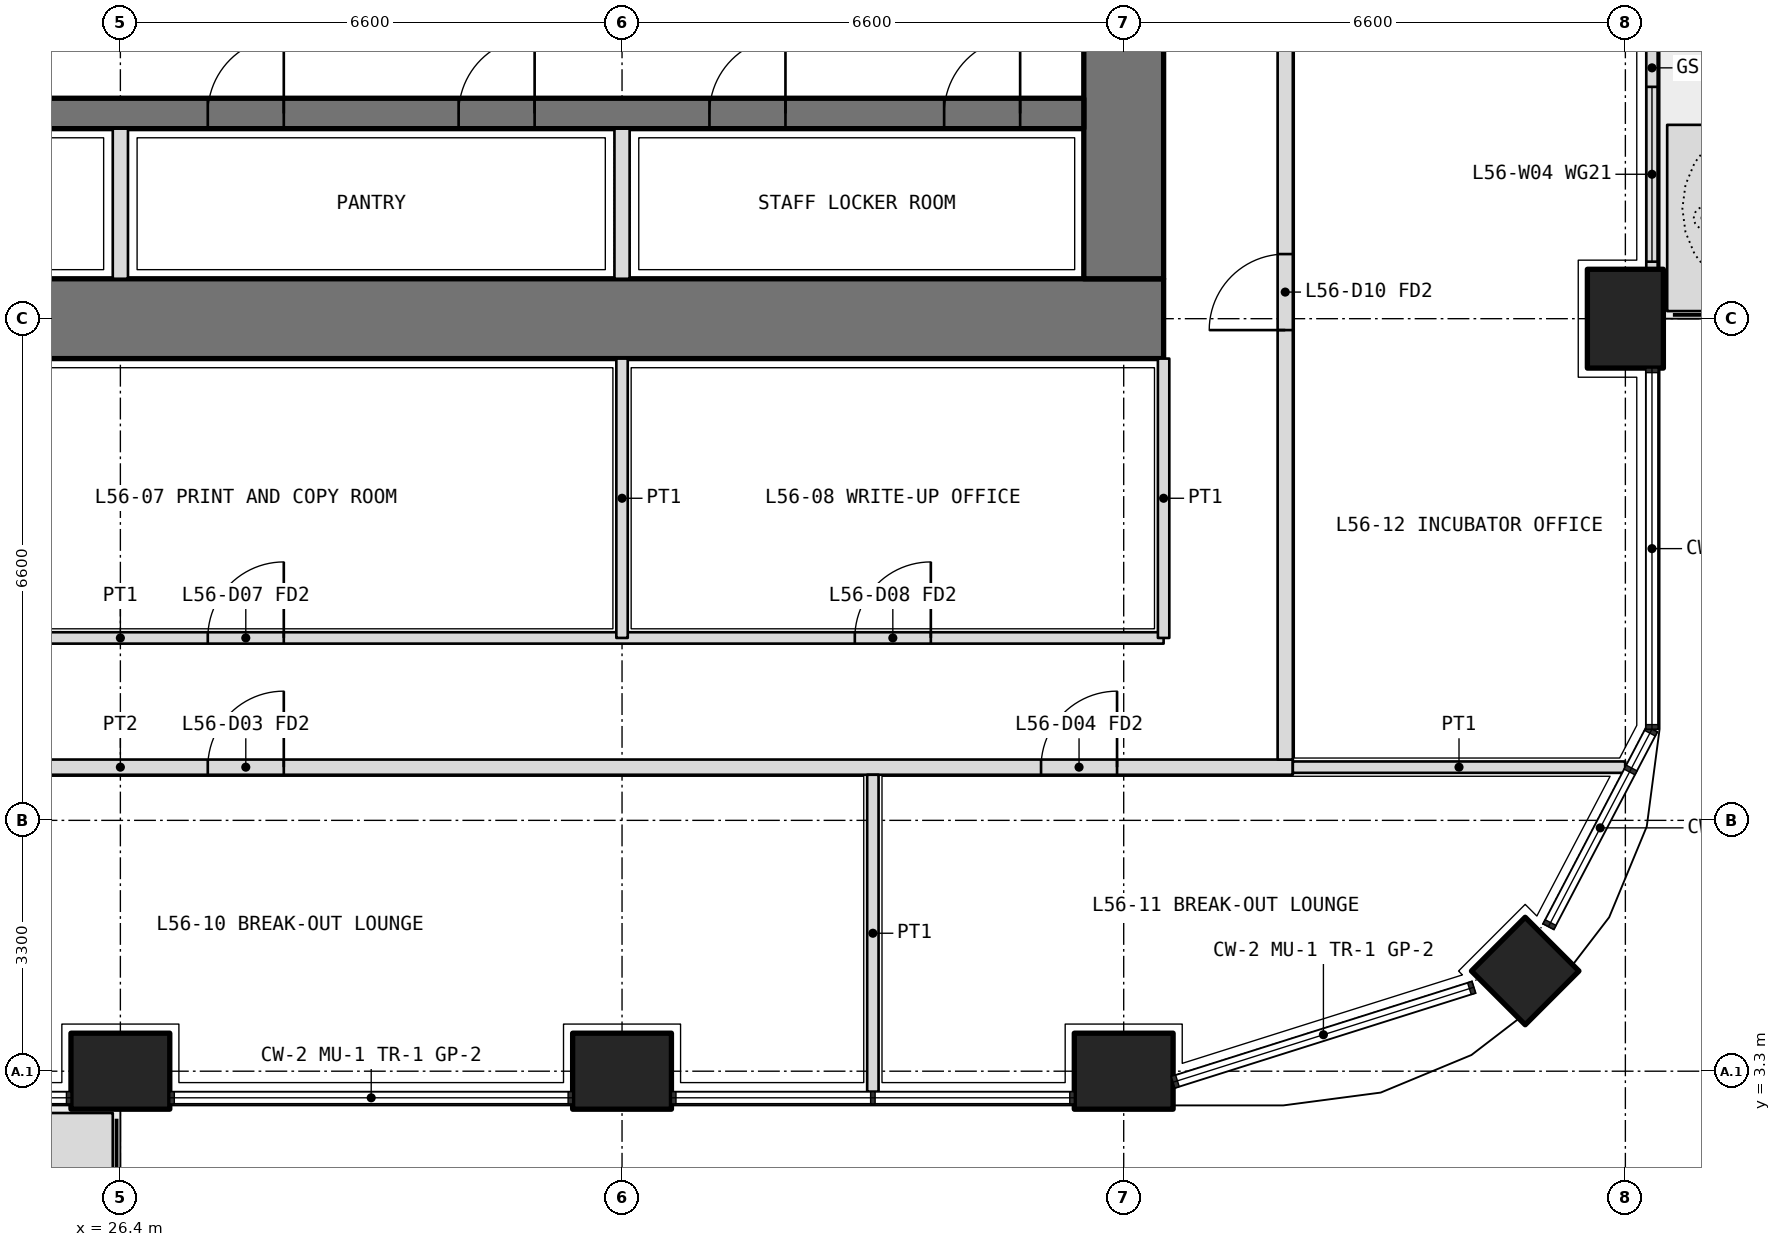
"""IFC4 building model, lengths in metres.
Left out: names, types, materials, properties, quantities, classifications, styles, units other than length and angle.
Written with IfcOpenShell. Run it as: python <this file> out.ifc"""

import sys

from ifc_helpers import new_model, si_unit, direction, frame, frame_2d, origin, origin_2d, place, context, subcontext, project, spatial, polyline, rectangle, outline, extrude, element, fill, save


model = new_model("IFC4")
c1 = context("Model", 3, precision=1e-05, world=origin(), true_north=direction((0.0, 1.0)))
c2 = subcontext(c1, "Body", "Model", "MODEL_VIEW")
j1 = project(units=[si_unit("LENGTHUNIT", "METRE"), si_unit("PLANEANGLEUNIT", "RADIAN")], contexts=[c1])
p1 = place(None, origin())
s1 = spatial("IfcSite", under=j1, at=p1, CompositionType="ELEMENT")
p2 = place(p1, origin())
s2 = spatial("IfcBuilding", under=s1, at=p2, CompositionType="ELEMENT")
p3 = place(p2, frame((0.0, 0.0, 246.0)))
s3 = spatial("IfcBuildingStorey", under=s2, at=p3, CompositionType="ELEMENT", Elevation=246.0)
p4 = place(p3, frame((44.882, 4.618, 0.0), z_axis=(0.0, 0.0, 1.0), x_axis=(0.707106781187, 0.707106781187, 0.0)))
e1 = element("IfcColumn", 1, at=p4, inside=s3, PredefinedType="COLUMN", context=c2, shape_type="SweptSolid", body=[
    extrude(rectangle(XDim=1.0, YDim=1.0, at=origin_2d()), origin(), (0.0, 0.0, 1.0), 4.2),
])
for number, where, z_axis, x_axis in (
    (2, (26.4, 3.3, 0.0), (0.0, 0.0, 1.0), (1.0, 0.0, 0.0)),
    (3, (33.0, 3.3, 0.0), (0.0, 0.0, 1.0), (1.0, 0.0, 0.0)),
    (4, (39.6, 3.3, 0.0), (0.0, 0.0, 1.0), (1.0, 0.0, 0.0)),
    (5, (46.2, 13.2, 0.0), (0.0, 0.0, 1.0), (0.0, 1.0, 0.0)),
):
    element("IfcColumn", number, at=place(p3, frame(where, z_axis=z_axis, x_axis=x_axis)), inside=s3, PredefinedType="COLUMN", context=c2, shape_type="SweptSolid", body=[
        extrude(rectangle(XDim=1.3, YDim=1.0, at=origin_2d()), origin(), (0.0, 0.0, 1.0), 4.2),
    ])
p5 = place(p3, origin())
e6 = element("IfcWall", 6, at=p5, inside=s3, PredefinedType="USERDEFINED", context=c2, shape_type="SweptSolid", body=[
    extrude(outline(polyline([(17.25, 1.75), (26.3, 1.75), (26.3, 2.75), (17.25, 2.75), (17.25, 1.75)]), holes=[polyline([(17.4, 1.9), (26.15, 1.9), (26.15, 2.6), (17.4, 2.6), (17.4, 1.9)])]), origin(), (0.0, 0.0, 1.0), 1.05),
])
p6 = place(p3, origin())
e7 = element("IfcWall", 7, at=p6, inside=s3, PredefinedType="USERDEFINED", context=c2, shape_type="SweptSolid", body=[
    extrude(outline(polyline([(46.75, 13.3), (47.75, 13.3), (47.75, 15.75), (46.75, 15.75), (46.75, 13.3)]), holes=[polyline([(46.9, 13.45), (47.6, 13.45), (47.6, 15.6), (46.9, 15.6), (46.9, 13.45)])]), origin(), (0.0, 0.0, 1.0), 1.05),
])
p7 = place(p3, frame((46.55, 13.85, 0.0), z_axis=(0.0, 0.0, 1.0), x_axis=(0.0, 1.0, 0.0)))
e8 = element("IfcWall", 8, at=p7, inside=s3, PredefinedType="SOLIDWALL", context=c2, shape_type="SweptSolid", body=[
    extrude(rectangle(XDim=5.3, YDim=0.15, at=frame_2d((2.65, 0.0))), origin(), (0.0, 0.0, 1.0), 2.7),
])
p8 = place(p7, frame((2.9, 0.0, 0.0)))
e9 = element("IfcOpeningElement", 9, at=p8, cuts=e8, PredefinedType="OPENING", context=c2, shape_type="SweptSolid", body=[
    extrude(rectangle(XDim=1.0, YDim=2.4, at=frame_2d((0.5, 1.2))), frame((0.0, 0.085, 0.0), z_axis=(0.0, -1.0, 0.0), x_axis=(1.0, 0.0, 0.0)), (0.0, 0.0, 1.0), 0.17),
])
p9 = place(p7, frame((0.1, 0.0, 0.1)))
e10 = element("IfcOpeningElement", 10, at=p9, cuts=e8, PredefinedType="OPENING", context=c2, shape_type="SweptSolid", body=[
    extrude(rectangle(XDim=2.3, YDim=2.3, at=frame_2d((1.15, 1.15))), frame((0.0, 0.085, 0.0), z_axis=(0.0, -1.0, 0.0), x_axis=(1.0, 0.0, 0.0)), (0.0, 0.0, 1.0), 0.17),
])
p10 = place(p7, frame((4.0, 0.0, 0.1)))
e11 = element("IfcOpeningElement", 11, at=p10, cuts=e8, PredefinedType="OPENING", context=c2, shape_type="SweptSolid", body=[
    extrude(rectangle(XDim=1.2, YDim=2.3, at=frame_2d((0.6, 1.15))), frame((0.0, 0.085, 0.0), z_axis=(0.0, -1.0, 0.0), x_axis=(1.0, 0.0, 0.0)), (0.0, 0.0, 1.0), 0.17),
])
p11 = place(p3, frame((12.675, 13.2, 0.0), z_axis=(0.0, 0.0, 1.0), x_axis=(1.0, 0.0, 0.0)))
e12 = element("IfcWall", 12, at=p11, inside=s3, PredefinedType="SHEAR", context=c2, shape_type="SweptSolid", body=[
    extrude(rectangle(XDim=27.45, YDim=1.05, at=frame_2d((13.725, 0.0))), origin(), (0.0, 0.0, 1.0), 4.2),
])
p12 = place(p3, frame((39.6, 13.725, 0.0), z_axis=(0.0, 0.0, 1.0), x_axis=(0.0, 1.0, 0.0)))
e13 = element("IfcWall", 13, at=p12, inside=s3, PredefinedType="SHEAR", context=c2, shape_type="SweptSolid", body=[
    extrude(rectangle(XDim=18.75, YDim=1.05, at=frame_2d((9.375, 0.0))), origin(), (0.0, 0.0, 1.0), 4.2),
])
p13 = place(p12, frame((3.025, 0.0, 0.0)))
e14 = element("IfcOpeningElement", 14, at=p13, cuts=e13, PredefinedType="OPENING", context=c2, shape_type="SweptSolid", body=[
    extrude(rectangle(XDim=1.6, YDim=2.1, at=frame_2d((0.8, 1.05))), frame((0.0, 0.535, 0.0), z_axis=(0.0, -1.0, 0.0), x_axis=(1.0, 0.0, 0.0)), (0.0, 0.0, 1.0), 1.07),
])
p14 = place(p12, frame((13.825, 0.0, 0.0)))
e15 = element("IfcOpeningElement", 15, at=p14, cuts=e13, PredefinedType="OPENING", context=c2, shape_type="SweptSolid", body=[
    extrude(rectangle(XDim=1.6, YDim=2.1, at=frame_2d((0.8, 1.05))), frame((0.0, 0.535, 0.0), z_axis=(0.0, -1.0, 0.0), x_axis=(1.0, 0.0, 0.0)), (0.0, 0.0, 1.0), 1.07),
])
p15 = place(p3, frame((13.725, 15.9, 0.0), z_axis=(0.0, 0.0, 1.0), x_axis=(1.0, 0.0, 0.0)))
e16 = element("IfcWall", 16, at=p15, inside=s3, PredefinedType="SHEAR", context=c2, shape_type="SweptSolid", body=[
    extrude(rectangle(XDim=25.35, YDim=0.4, at=frame_2d((12.675, 0.0))), origin(), (0.0, 0.0, 1.0), 4.2),
])
p16 = place(p15, frame((0.837, 0.0, 0.0)))
e17 = element("IfcOpeningElement", 17, at=p16, cuts=e16, PredefinedType="OPENING", context=c2, shape_type="SweptSolid", body=[
    extrude(rectangle(XDim=1.0, YDim=2.1, at=frame_2d((0.5, 1.05))), frame((0.0, 0.21, 0.0), z_axis=(0.0, -1.0, 0.0), x_axis=(1.0, 0.0, 0.0)), (0.0, 0.0, 1.0), 0.42),
])
p17 = place(p15, frame((3.925, 0.0, 0.0)))
e18 = element("IfcOpeningElement", 18, at=p17, cuts=e16, PredefinedType="OPENING", context=c2, shape_type="SweptSolid", body=[
    extrude(rectangle(XDim=1.0, YDim=2.1, at=frame_2d((0.5, 1.05))), frame((0.0, 0.21, 0.0), z_axis=(0.0, -1.0, 0.0), x_axis=(1.0, 0.0, 0.0)), (0.0, 0.0, 1.0), 0.42),
])
p18 = place(p15, frame((7.225, 0.0, 0.0)))
e19 = element("IfcOpeningElement", 19, at=p18, cuts=e16, PredefinedType="OPENING", context=c2, shape_type="SweptSolid", body=[
    extrude(rectangle(XDim=1.0, YDim=2.1, at=frame_2d((0.5, 1.05))), frame((0.0, 0.21, 0.0), z_axis=(0.0, -1.0, 0.0), x_axis=(1.0, 0.0, 0.0)), (0.0, 0.0, 1.0), 0.42),
])
p19 = place(p15, frame((10.525, 0.0, 0.0)))
e20 = element("IfcOpeningElement", 20, at=p19, cuts=e16, PredefinedType="OPENING", context=c2, shape_type="SweptSolid", body=[
    extrude(rectangle(XDim=1.0, YDim=2.1, at=frame_2d((0.5, 1.05))), frame((0.0, 0.21, 0.0), z_axis=(0.0, -1.0, 0.0), x_axis=(1.0, 0.0, 0.0)), (0.0, 0.0, 1.0), 0.42),
])
p20 = place(p15, frame((13.825, 0.0, 0.0)))
e21 = element("IfcOpeningElement", 21, at=p20, cuts=e16, PredefinedType="OPENING", context=c2, shape_type="SweptSolid", body=[
    extrude(rectangle(XDim=1.0, YDim=2.1, at=frame_2d((0.5, 1.05))), frame((0.0, 0.21, 0.0), z_axis=(0.0, -1.0, 0.0), x_axis=(1.0, 0.0, 0.0)), (0.0, 0.0, 1.0), 0.42),
])
p21 = place(p15, frame((17.125, 0.0, 0.0)))
e22 = element("IfcOpeningElement", 22, at=p21, cuts=e16, PredefinedType="OPENING", context=c2, shape_type="SweptSolid", body=[
    extrude(rectangle(XDim=1.0, YDim=2.1, at=frame_2d((0.5, 1.05))), frame((0.0, 0.21, 0.0), z_axis=(0.0, -1.0, 0.0), x_axis=(1.0, 0.0, 0.0)), (0.0, 0.0, 1.0), 0.42),
])
p22 = place(p15, frame((20.425, 0.0, 0.0)))
e23 = element("IfcOpeningElement", 23, at=p22, cuts=e16, PredefinedType="OPENING", context=c2, shape_type="SweptSolid", body=[
    extrude(rectangle(XDim=1.0, YDim=2.1, at=frame_2d((0.5, 1.05))), frame((0.0, 0.21, 0.0), z_axis=(0.0, -1.0, 0.0), x_axis=(1.0, 0.0, 0.0)), (0.0, 0.0, 1.0), 0.42),
])
p23 = place(p15, frame((23.512, 0.0, 0.0)))
e24 = element("IfcOpeningElement", 24, at=p23, cuts=e16, PredefinedType="OPENING", context=c2, shape_type="SweptSolid", body=[
    extrude(rectangle(XDim=1.0, YDim=2.1, at=frame_2d((0.5, 1.05))), frame((0.0, 0.21, 0.0), z_axis=(0.0, -1.0, 0.0), x_axis=(1.0, 0.0, 0.0)), (0.0, 0.0, 1.0), 0.42),
])
for number, where, z_axis, x_axis in (
    (25, (26.4, 13.725, 0.0), (0.0, 0.0, 1.0), (0.0, 1.0, 0.0)),
    (26, (33.0, 13.725, 0.0), (0.0, 0.0, 1.0), (0.0, 1.0, 0.0)),
):
    element("IfcWall", number, at=place(p3, frame(where, z_axis=z_axis, x_axis=x_axis)), inside=s3, PredefinedType="PARTITIONING", context=c2, shape_type="SweptSolid", body=[
        extrude(rectangle(XDim=1.975, YDim=0.2, at=frame_2d((0.987, 0.0))), origin(), (0.0, 0.0, 1.0), 4.2),
    ])
p24 = place(p3, frame((12.675, 9.0, 0.0), z_axis=(0.0, 0.0, 1.0), x_axis=(1.0, 0.0, 0.0)))
e27 = element("IfcWall", 27, at=p24, inside=s3, PredefinedType="PARTITIONING", context=c2, shape_type="SweptSolid", body=[
    extrude(rectangle(XDim=27.45, YDim=0.15, at=frame_2d((13.725, 0.0))), origin(), (0.0, 0.0, 1.0), 3.0),
])
p25 = place(p24, frame((1.413, 0.0, 0.0)))
e28 = element("IfcOpeningElement", 28, at=p25, cuts=e27, PredefinedType="OPENING", context=c2, shape_type="SweptSolid", body=[
    extrude(rectangle(XDim=1.0, YDim=2.1, at=frame_2d((0.5, 1.05))), frame((0.0, 0.085, 0.0), z_axis=(0.0, -1.0, 0.0), x_axis=(1.0, 0.0, 0.0)), (0.0, 0.0, 1.0), 0.17),
])
p26 = place(p24, frame((6.625, 0.0, 0.0)))
e29 = element("IfcOpeningElement", 29, at=p26, cuts=e27, PredefinedType="OPENING", context=c2, shape_type="SweptSolid", body=[
    extrude(rectangle(XDim=1.0, YDim=2.1, at=frame_2d((0.5, 1.05))), frame((0.0, 0.085, 0.0), z_axis=(0.0, -1.0, 0.0), x_axis=(1.0, 0.0, 0.0)), (0.0, 0.0, 1.0), 0.17),
])
p27 = place(p24, frame((14.875, 0.0, 0.0)))
e30 = element("IfcOpeningElement", 30, at=p27, cuts=e27, PredefinedType="OPENING", context=c2, shape_type="SweptSolid", body=[
    extrude(rectangle(XDim=1.0, YDim=2.1, at=frame_2d((0.5, 1.05))), frame((0.0, 0.085, 0.0), z_axis=(0.0, -1.0, 0.0), x_axis=(1.0, 0.0, 0.0)), (0.0, 0.0, 1.0), 0.17),
])
p28 = place(p24, frame((23.387, 0.0, 0.0)))
e31 = element("IfcOpeningElement", 31, at=p28, cuts=e27, PredefinedType="OPENING", context=c2, shape_type="SweptSolid", body=[
    extrude(rectangle(XDim=1.0, YDim=2.1, at=frame_2d((0.5, 1.05))), frame((0.0, 0.085, 0.0), z_axis=(0.0, -1.0, 0.0), x_axis=(1.0, 0.0, 0.0)), (0.0, 0.0, 1.0), 0.17),
])
for number, where, z_axis, x_axis in (
    (32, (40.125, 12.675, 0.0), (0.0, 0.0, 1.0), (0.0, -1.0, 0.0)),
    (33, (33.0, 12.675, 0.0), (0.0, 0.0, 1.0), (0.0, -1.0, 0.0)),
):
    element("IfcWall", number, at=place(p3, frame(where, z_axis=z_axis, x_axis=x_axis)), inside=s3, PredefinedType="PARTITIONING", context=c2, shape_type="SweptSolid", body=[
        extrude(rectangle(XDim=3.675, YDim=0.15, at=frame_2d((1.837, 0.0))), origin(), (0.0, 0.0, 1.0), 3.0),
    ])
p29 = place(p3, frame((10.975, 7.3, 0.0), z_axis=(0.0, 0.0, 1.0), x_axis=(1.0, 0.0, 0.0)))
e34 = element("IfcWall", 34, at=p29, inside=s3, PredefinedType="PARTITIONING", context=c2, shape_type="SweptSolid", body=[
    extrude(rectangle(XDim=30.85, YDim=0.2, at=frame_2d((15.425, 0.0))), origin(), (0.0, 0.0, 1.0), 3.0),
])
p30 = place(p29, frame((3.863, 0.0, 0.0)))
e35 = element("IfcOpeningElement", 35, at=p30, cuts=e34, PredefinedType="OPENING", context=c2, shape_type="SweptSolid", body=[
    extrude(rectangle(XDim=1.2, YDim=2.1, at=frame_2d((0.6, 1.05))), frame((0.0, 0.11, 0.0), z_axis=(0.0, -1.0, 0.0), x_axis=(1.0, 0.0, 0.0)), (0.0, 0.0, 1.0), 0.22),
])
p31 = place(p29, frame((16.575, 0.0, 0.0)))
e36 = element("IfcOpeningElement", 36, at=p31, cuts=e34, PredefinedType="OPENING", context=c2, shape_type="SweptSolid", body=[
    extrude(rectangle(XDim=1.0, YDim=2.1, at=frame_2d((0.5, 1.05))), frame((0.0, 0.11, 0.0), z_axis=(0.0, -1.0, 0.0), x_axis=(1.0, 0.0, 0.0)), (0.0, 0.0, 1.0), 0.22),
])
p32 = place(p29, frame((27.538, 0.0, 0.0)))
e37 = element("IfcOpeningElement", 37, at=p32, cuts=e34, PredefinedType="OPENING", context=c2, shape_type="SweptSolid", body=[
    extrude(rectangle(XDim=1.0, YDim=2.1, at=frame_2d((0.5, 1.05))), frame((0.0, 0.11, 0.0), z_axis=(0.0, -1.0, 0.0), x_axis=(1.0, 0.0, 0.0)), (0.0, 0.0, 1.0), 0.22),
])
p33 = place(p3, frame((41.725, 7.4, 0.0), z_axis=(0.0, 0.0, 1.0), x_axis=(0.0, 1.0, 0.0)))
e38 = element("IfcWall", 38, at=p33, inside=s3, PredefinedType="PARTITIONING", context=c2, shape_type="SweptSolid", body=[
    extrude(rectangle(XDim=31.4, YDim=0.2, at=frame_2d((15.7, 0.0))), origin(), (0.0, 0.0, 1.0), 3.0),
])
p34 = place(p33, frame((5.65, 0.0, 0.0)))
e39 = element("IfcOpeningElement", 39, at=p34, cuts=e38, PredefinedType="OPENING", context=c2, shape_type="SweptSolid", body=[
    extrude(rectangle(XDim=1.0, YDim=2.1, at=frame_2d((0.5, 1.05))), frame((0.0, 0.11, 0.0), z_axis=(0.0, -1.0, 0.0), x_axis=(1.0, 0.0, 0.0)), (0.0, 0.0, 1.0), 0.22),
])
p35 = place(p33, frame((13.4, 0.0, 0.0)))
e40 = element("IfcOpeningElement", 40, at=p35, cuts=e38, PredefinedType="OPENING", context=c2, shape_type="SweptSolid", body=[
    extrude(rectangle(XDim=1.0, YDim=2.1, at=frame_2d((0.5, 1.05))), frame((0.0, 0.11, 0.0), z_axis=(0.0, -1.0, 0.0), x_axis=(1.0, 0.0, 0.0)), (0.0, 0.0, 1.0), 0.22),
])
p36 = place(p33, frame((16.75, 0.0, 0.0)))
e41 = element("IfcOpeningElement", 41, at=p36, cuts=e38, PredefinedType="OPENING", context=c2, shape_type="SweptSolid", body=[
    extrude(rectangle(XDim=0.9, YDim=2.1, at=frame_2d((0.45, 1.05))), frame((0.0, 0.11, 0.0), z_axis=(0.0, -1.0, 0.0), x_axis=(1.0, 0.0, 0.0)), (0.0, 0.0, 1.0), 0.22),
])
p37 = place(p33, frame((21.8, 0.0, 0.0)))
e42 = element("IfcOpeningElement", 42, at=p37, cuts=e38, PredefinedType="OPENING", context=c2, shape_type="SweptSolid", body=[
    extrude(rectangle(XDim=1.0, YDim=2.1, at=frame_2d((0.5, 1.05))), frame((0.0, 0.11, 0.0), z_axis=(0.0, -1.0, 0.0), x_axis=(1.0, 0.0, 0.0)), (0.0, 0.0, 1.0), 0.22),
])
p38 = place(p33, frame((28.05, 0.0, 0.0)))
e43 = element("IfcOpeningElement", 43, at=p38, cuts=e38, PredefinedType="OPENING", context=c2, shape_type="SweptSolid", body=[
    extrude(rectangle(XDim=1.0, YDim=2.1, at=frame_2d((0.5, 1.05))), frame((0.0, 0.11, 0.0), z_axis=(0.0, -1.0, 0.0), x_axis=(1.0, 0.0, 0.0)), (0.0, 0.0, 1.0), 0.22),
])
p39 = place(p3, frame((46.198, 7.3, 0.0), z_axis=(0.0, 0.0, 1.0), x_axis=(-1.0, 0.0, 0.0)))
e44 = element("IfcWall", 44, at=p39, inside=s3, PredefinedType="PARTITIONING", context=c2, shape_type="SweptSolid", body=[
    extrude(rectangle(XDim=4.373, YDim=0.15, at=frame_2d((2.186, 0.0))), origin(), (0.0, 0.0, 1.0), 2.7),
])
p40 = place(p3, frame((36.3, 3.03, 0.0), z_axis=(0.0, 0.0, 1.0), x_axis=(0.0, 1.0, 0.0)))
e45 = element("IfcWall", 45, at=p40, inside=s3, PredefinedType="PARTITIONING", context=c2, shape_type="SweptSolid", body=[
    extrude(rectangle(XDim=4.17, YDim=0.15, at=frame_2d((2.085, 0.0))), origin(), (0.0, 0.0, 1.0), 2.7),
])
p41 = place(p9, origin())
e46 = element("IfcWindow", 46, at=p41, inside=s3, PartitioningType="SINGLE_PANEL", PredefinedType="WINDOW", context=c2, shape_type="SweptSolid", body=[
    extrude(rectangle(XDim=2.3, YDim=2.3, at=frame_2d((1.15, 1.15))), frame((0.0, 0.03, 0.0), z_axis=(0.0, -1.0, 0.0), x_axis=(1.0, 0.0, 0.0)), (0.0, 0.0, 1.0), 0.06),
])
fill(e10, e46)
p42 = place(p27, origin())
e47 = element("IfcDoor", 47, at=p42, inside=s3, OperationType="SINGLE_SWING_RIGHT", PredefinedType="DOOR", context=c2, shape_type="SweptSolid", body=[
    extrude(rectangle(XDim=1.0, YDim=2.1, at=frame_2d((0.5, 1.05))), frame((0.0, 0.025, 0.0), z_axis=(0.0, -1.0, 0.0), x_axis=(1.0, 0.0, 0.0)), (0.0, 0.0, 1.0), 0.05),
])
fill(e30, e47)
p43 = place(p28, origin())
e48 = element("IfcDoor", 48, at=p43, inside=s3, OperationType="SINGLE_SWING_RIGHT", PredefinedType="DOOR", context=c2, shape_type="SweptSolid", body=[
    extrude(rectangle(XDim=1.0, YDim=2.1, at=frame_2d((0.5, 1.05))), frame((0.0, 0.025, 0.0), z_axis=(0.0, -1.0, 0.0), x_axis=(1.0, 0.0, 0.0)), (0.0, 0.0, 1.0), 0.05),
])
fill(e31, e48)
p44 = place(p31, origin())
e49 = element("IfcDoor", 49, at=p44, inside=s3, OperationType="SINGLE_SWING_RIGHT", PredefinedType="DOOR", context=c2, shape_type="SweptSolid", body=[
    extrude(rectangle(XDim=1.0, YDim=2.1, at=frame_2d((0.5, 1.05))), frame((0.0, 0.025, 0.0), z_axis=(0.0, -1.0, 0.0), x_axis=(1.0, 0.0, 0.0)), (0.0, 0.0, 1.0), 0.05),
])
fill(e36, e49)
p45 = place(p32, origin())
e50 = element("IfcDoor", 50, at=p45, inside=s3, OperationType="SINGLE_SWING_RIGHT", PredefinedType="DOOR", context=c2, shape_type="SweptSolid", body=[
    extrude(rectangle(XDim=1.0, YDim=2.1, at=frame_2d((0.5, 1.05))), frame((0.0, 0.025, 0.0), z_axis=(0.0, -1.0, 0.0), x_axis=(1.0, 0.0, 0.0)), (0.0, 0.0, 1.0), 0.05),
])
fill(e37, e50)
p46 = place(p34, origin())
e51 = element("IfcDoor", 51, at=p46, inside=s3, OperationType="SINGLE_SWING_LEFT", PredefinedType="DOOR", context=c2, shape_type="SweptSolid", body=[
    extrude(rectangle(XDim=1.0, YDim=2.1, at=frame_2d((0.5, 1.05))), frame((0.0, 0.025, 0.0), z_axis=(0.0, -1.0, 0.0), x_axis=(1.0, 0.0, 0.0)), (0.0, 0.0, 1.0), 0.05),
])
fill(e39, e51)
p47 = place(p20, origin())
e52 = element("IfcDoor", 52, at=p47, inside=s3, OperationType="SINGLE_SWING_RIGHT", PredefinedType="DOOR", context=c2, shape_type="SweptSolid", body=[
    extrude(rectangle(XDim=1.0, YDim=2.1, at=frame_2d((0.5, 1.05))), frame((0.0, 0.025, 0.0), z_axis=(0.0, -1.0, 0.0), x_axis=(1.0, 0.0, 0.0)), (0.0, 0.0, 1.0), 0.05),
])
fill(e21, e52)
p48 = place(p21, origin())
e53 = element("IfcDoor", 53, at=p48, inside=s3, OperationType="SINGLE_SWING_RIGHT", PredefinedType="DOOR", context=c2, shape_type="SweptSolid", body=[
    extrude(rectangle(XDim=1.0, YDim=2.1, at=frame_2d((0.5, 1.05))), frame((0.0, 0.025, 0.0), z_axis=(0.0, -1.0, 0.0), x_axis=(1.0, 0.0, 0.0)), (0.0, 0.0, 1.0), 0.05),
])
fill(e22, e53)
p49 = place(p22, origin())
e54 = element("IfcDoor", 54, at=p49, inside=s3, OperationType="SINGLE_SWING_RIGHT", PredefinedType="DOOR", context=c2, shape_type="SweptSolid", body=[
    extrude(rectangle(XDim=1.0, YDim=2.1, at=frame_2d((0.5, 1.05))), frame((0.0, 0.025, 0.0), z_axis=(0.0, -1.0, 0.0), x_axis=(1.0, 0.0, 0.0)), (0.0, 0.0, 1.0), 0.05),
])
fill(e23, e54)
p50 = place(p23, origin())
e55 = element("IfcDoor", 55, at=p50, inside=s3, OperationType="SINGLE_SWING_RIGHT", PredefinedType="DOOR", context=c2, shape_type="SweptSolid", body=[
    extrude(rectangle(XDim=1.0, YDim=2.1, at=frame_2d((0.5, 1.05))), frame((0.0, 0.025, 0.0), z_axis=(0.0, -1.0, 0.0), x_axis=(1.0, 0.0, 0.0)), (0.0, 0.0, 1.0), 0.05),
])
fill(e24, e55)
save(model, sys.argv[1])
